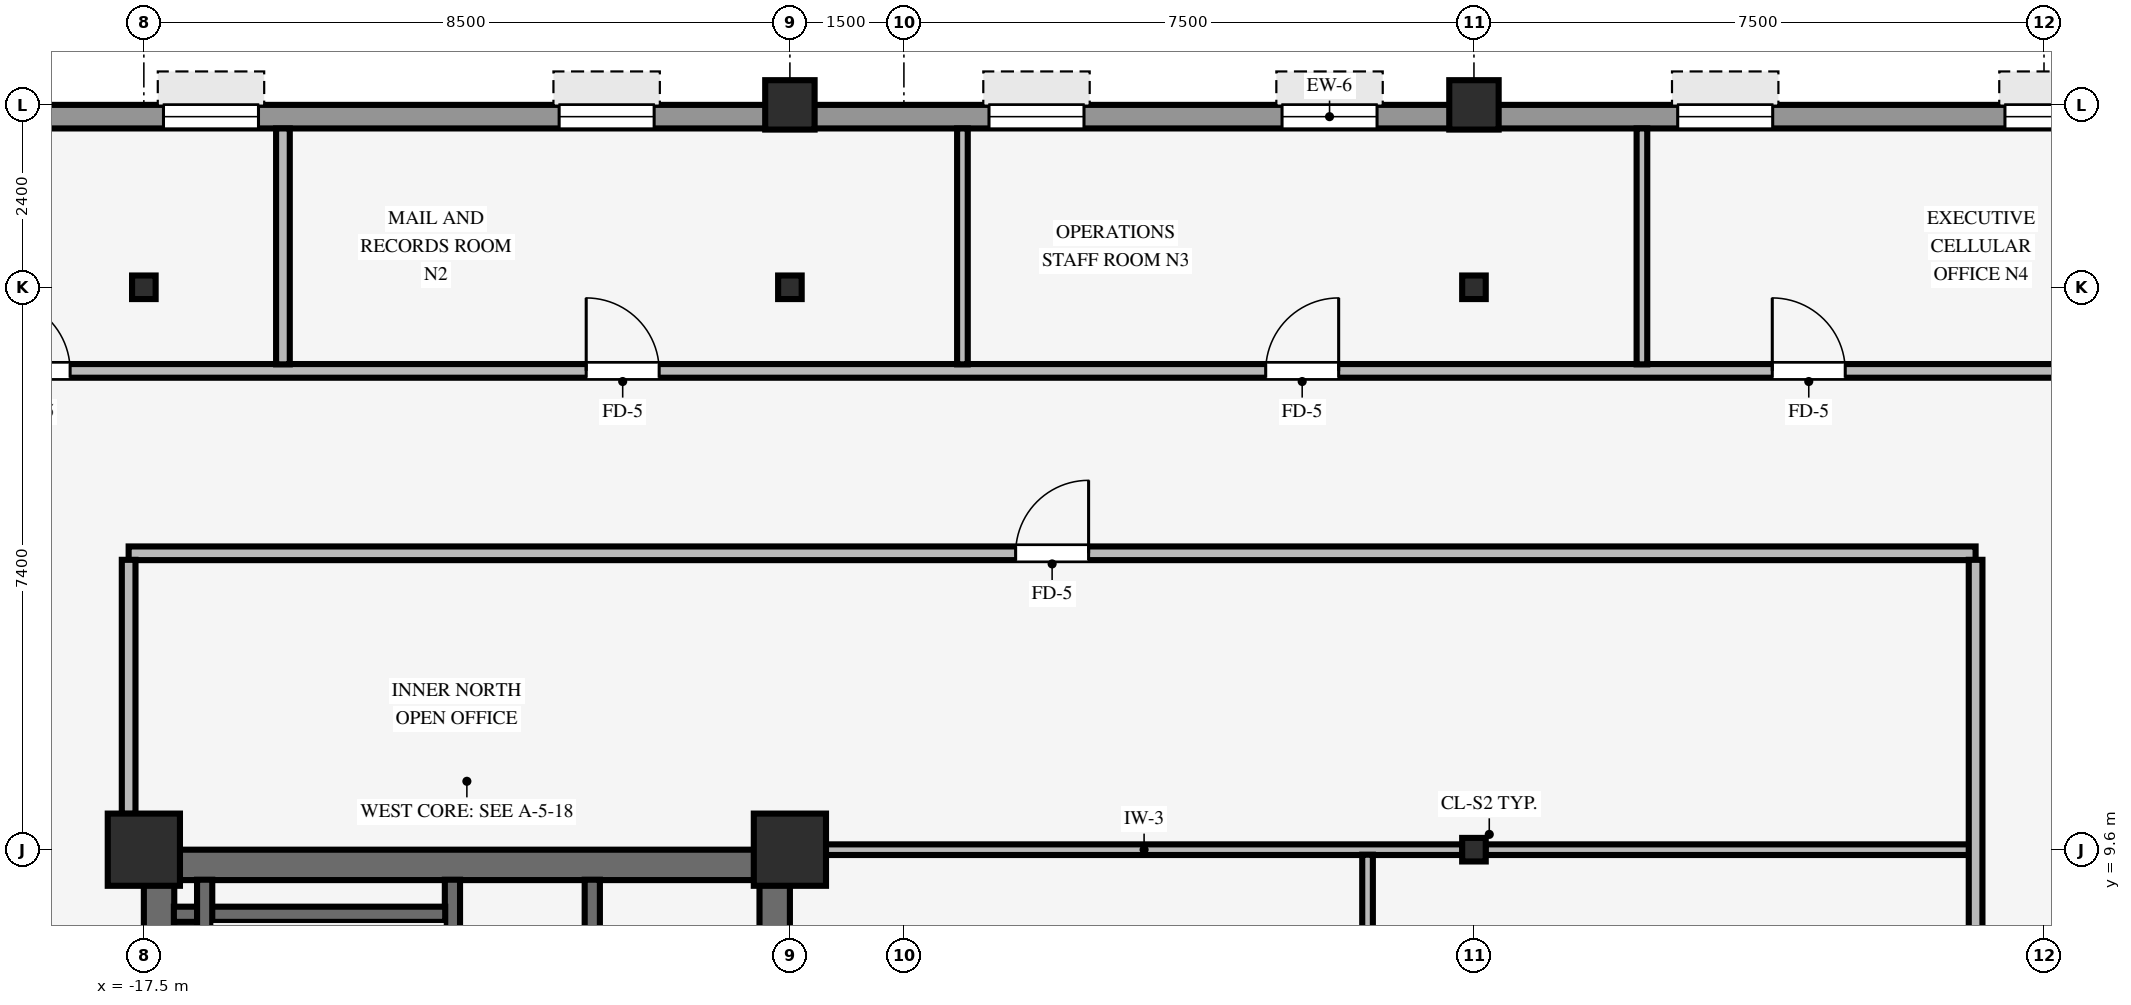
"""IFC4 building model, lengths in metres.
Left out: names, types, materials, properties, quantities, classifications, styles, units other than length and angle.
Written with IfcOpenShell. Run it as: python <this file> out.ifc"""

import sys

from ifc_helpers import new_model, si_unit, direction, frame, frame_2d, origin, origin_2d, place, context, subcontext, project, spatial, rectangle, hollow_rectangle, i_section, extrude, source, transform, mapped, element, fill, save


model = new_model("IFC4")
c1 = context("Model", 3, precision=1e-05, world=origin(), true_north=direction((0.0, 1.0)))
c2 = subcontext(c1, "Body", "Model", "MODEL_VIEW")
j1 = project(units=[si_unit("LENGTHUNIT", "METRE"), si_unit("PLANEANGLEUNIT", "RADIAN")], contexts=[c1])
p1 = place(None, origin())
s1 = spatial("IfcSite", under=j1, at=p1, CompositionType="ELEMENT")
p2 = place(p1, origin())
s2 = spatial("IfcBuilding", under=s1, at=p2, CompositionType="ELEMENT")
p3 = place(p2, frame((0.0, 0.0, 182.25)))
s3 = spatial("IfcBuildingStorey", under=s2, at=p3, CompositionType="ELEMENT", Elevation=182.25)
p4 = place(p3, frame((-17.5, 9.4, 0.0), z_axis=(0.0, 0.0, 1.0), x_axis=(1.0, 0.0, 0.0)))
e1 = element("IfcWall", 1, at=p4, inside=s3, PredefinedType="SHEAR", context=c2, shape_type="SweptSolid", body=[
    extrude(rectangle(XDim=8.5, YDim=0.4, at=frame_2d((4.25, 0.0))), origin(), (0.0, 0.0, 1.0), 3.25),
])
p5 = place(p3, frame((-17.3, -9.205, 0.0), z_axis=(0.0, 0.0, 1.0), x_axis=(0.0, 1.0, 0.0)))
e2 = element("IfcWall", 2, at=p5, inside=s3, PredefinedType="SHEAR", context=c2, shape_type="SweptSolid", body=[
    extrude(rectangle(XDim=18.41, YDim=0.4, at=frame_2d((9.205, 0.0))), origin(), (0.0, 0.0, 1.0), 3.25),
])
p6 = place(p3, frame((-9.2, -9.205, 0.0), z_axis=(0.0, 0.0, 1.0), x_axis=(0.0, 1.0, 0.0)))
e3 = element("IfcWall", 3, at=p6, inside=s3, PredefinedType="SHEAR", context=c2, shape_type="SweptSolid", body=[
    extrude(rectangle(XDim=18.41, YDim=0.4, at=frame_2d((9.205, 0.0))), origin(), (0.0, 0.0, 1.0), 3.25),
])
p7 = place(p6, frame((8.605, 0.0, 0.0)))
e4 = element("IfcOpeningElement", 4, at=p7, cuts=e3, PredefinedType="OPENING", context=c2, shape_type="SweptSolid", body=[
    extrude(rectangle(XDim=1.2, YDim=2.15, at=frame_2d((0.6, 1.075))), frame((0.0, 0.21, 0.0), z_axis=(0.0, -1.0, 0.0), x_axis=(1.0, 0.0, 0.0)), (0.0, 0.0, 1.0), 0.42),
])
for number, where, z_axis, x_axis in (
    (5, (-17.5, 9.6, 0.0), (0.0, 0.0, 1.0), (1.0, 0.0, 0.0)),
    (6, (-9.0, 9.6, 0.0), (0.0, 0.0, 1.0), (1.0, 0.0, 0.0)),
):
    element("IfcColumn", number, at=place(p3, frame(where, z_axis=z_axis, x_axis=x_axis)), inside=s3, PredefinedType="COLUMN", context=c2, shape_type="SweptSolid", body=[
        extrude(rectangle(XDim=0.95, YDim=0.95, at=origin_2d()), origin(), (0.0, 0.0, 1.0), 3.25),
    ])
for number, where, z_axis, x_axis in (
    (7, (-9.0, 19.4, 0.0), (0.0, 0.0, 1.0), (1.0, 0.0, 0.0)),
    (8, (0.0, 19.4, 0.0), (0.0, 0.0, 1.0), (1.0, 0.0, 0.0)),
):
    element("IfcColumn", number, at=place(p3, frame(where, z_axis=z_axis, x_axis=x_axis)), inside=s3, PredefinedType="COLUMN", context=c2, shape_type="SweptSolid", body=[
        extrude(hollow_rectangle(XDim=0.65, YDim=0.65, WallThickness=0.04, InnerFilletRadius=0.04, OuterFilletRadius=0.08, at=origin_2d()), origin(), (0.0, 0.0, 1.0), 3.25),
    ])
for number, where, z_axis, x_axis in (
    (9, (0.0, 9.6, 0.0), (0.0, 0.0, 1.0), (1.0, 0.0, 0.0)),
    (10, (0.0, 17.0, 0.0), (0.0, 0.0, 1.0), (1.0, 0.0, 0.0)),
    (11, (-17.5, 17.0, 0.0), (0.0, 0.0, 1.0), (1.0, 0.0, 0.0)),
    (12, (-9.0, 17.0, 0.0), (0.0, 0.0, 1.0), (1.0, 0.0, 0.0)),
):
    element("IfcColumn", number, at=place(p3, frame(where, z_axis=z_axis, x_axis=x_axis)), inside=s3, PredefinedType="COLUMN", context=c2, shape_type="SweptSolid", body=[
        extrude(i_section(OverallWidth=0.31, OverallDepth=0.31, WebThickness=0.015, FlangeThickness=0.015, FilletRadius=0.015, at=origin_2d()), origin(), (0.0, 0.0, 1.0), 3.25),
    ])
p8 = place(p3, frame((-24.3, 19.245, 0.0), z_axis=(0.0, 0.0, 1.0), x_axis=(1.0, 0.0, 0.0)))
e13 = element("IfcWall", 13, at=p8, inside=s3, PredefinedType="STANDARD", context=c2, shape_type="SweptSolid", body=[
    extrude(rectangle(XDim=44.8, YDim=0.31, at=frame_2d((22.4, 0.0))), origin(), (0.0, 0.0, 1.0), 2.585),
])
p9 = place(p8, frame((2.753, 0.0, 0.8)))
e14 = element("IfcOpeningElement", 14, at=p9, cuts=e13, PredefinedType="OPENING", context=c2, shape_type="SweptSolid", body=[
    extrude(rectangle(XDim=1.25, YDim=1.52, at=frame_2d((0.625, 0.76))), frame((0.0, 0.165, 0.0), z_axis=(0.0, -1.0, 0.0), x_axis=(1.0, 0.0, 0.0)), (0.0, 0.0, 1.0), 0.33),
])
p10 = place(p8, frame((7.058, 0.0, 0.8)))
e15 = element("IfcOpeningElement", 15, at=p10, cuts=e13, PredefinedType="OPENING", context=c2, shape_type="SweptSolid", body=[
    extrude(rectangle(XDim=1.25, YDim=1.52, at=frame_2d((0.625, 0.76))), frame((0.0, 0.165, 0.0), z_axis=(0.0, -1.0, 0.0), x_axis=(1.0, 0.0, 0.0)), (0.0, 0.0, 1.0), 0.33),
])
p11 = place(p8, frame((12.264, 0.0, 0.8)))
e16 = element("IfcOpeningElement", 16, at=p11, cuts=e13, PredefinedType="OPENING", context=c2, shape_type="SweptSolid", body=[
    extrude(rectangle(XDim=1.25, YDim=1.52, at=frame_2d((0.625, 0.76))), frame((0.0, 0.165, 0.0), z_axis=(0.0, -1.0, 0.0), x_axis=(1.0, 0.0, 0.0)), (0.0, 0.0, 1.0), 0.33),
])
p12 = place(p8, frame((17.919, 0.0, 0.8)))
e17 = element("IfcOpeningElement", 17, at=p12, cuts=e13, PredefinedType="OPENING", context=c2, shape_type="SweptSolid", body=[
    extrude(rectangle(XDim=1.25, YDim=1.52, at=frame_2d((0.625, 0.76))), frame((0.0, 0.165, 0.0), z_axis=(0.0, -1.0, 0.0), x_axis=(1.0, 0.0, 0.0)), (0.0, 0.0, 1.0), 0.33),
])
p13 = place(p8, frame((21.775, 0.0, 0.8)))
e18 = element("IfcOpeningElement", 18, at=p13, cuts=e13, PredefinedType="OPENING", context=c2, shape_type="SweptSolid", body=[
    extrude(rectangle(XDim=1.25, YDim=1.52, at=frame_2d((0.625, 0.76))), frame((0.0, 0.165, 0.0), z_axis=(0.0, -1.0, 0.0), x_axis=(1.0, 0.0, 0.0)), (0.0, 0.0, 1.0), 0.33),
])
p14 = place(p8, frame((26.981, 0.0, 0.8)))
e19 = element("IfcOpeningElement", 19, at=p14, cuts=e13, PredefinedType="OPENING", context=c2, shape_type="SweptSolid", body=[
    extrude(rectangle(XDim=1.25, YDim=1.52, at=frame_2d((0.625, 0.76))), frame((0.0, 0.165, 0.0), z_axis=(0.0, -1.0, 0.0), x_axis=(1.0, 0.0, 0.0)), (0.0, 0.0, 1.0), 0.33),
])
p15 = place(p8, frame((31.286, 0.0, 0.8)))
e20 = element("IfcOpeningElement", 20, at=p15, cuts=e13, PredefinedType="OPENING", context=c2, shape_type="SweptSolid", body=[
    extrude(rectangle(XDim=1.25, YDim=1.52, at=frame_2d((0.625, 0.76))), frame((0.0, 0.165, 0.0), z_axis=(0.0, -1.0, 0.0), x_axis=(1.0, 0.0, 0.0)), (0.0, 0.0, 1.0), 0.33),
])
p16 = place(p8, frame((36.042, 0.0, 0.8)))
e21 = element("IfcOpeningElement", 21, at=p16, cuts=e13, PredefinedType="OPENING", context=c2, shape_type="SweptSolid", body=[
    extrude(rectangle(XDim=1.25, YDim=1.52, at=frame_2d((0.625, 0.76))), frame((0.0, 0.165, 0.0), z_axis=(0.0, -1.0, 0.0), x_axis=(1.0, 0.0, 0.0)), (0.0, 0.0, 1.0), 0.33),
])
p17 = place(p8, frame((40.797, 0.0, 0.8)))
e22 = element("IfcOpeningElement", 22, at=p17, cuts=e13, PredefinedType="OPENING", context=c2, shape_type="SweptSolid", body=[
    extrude(rectangle(XDim=1.25, YDim=1.52, at=frame_2d((0.625, 0.76))), frame((0.0, 0.165, 0.0), z_axis=(0.0, -1.0, 0.0), x_axis=(1.0, 0.0, 0.0)), (0.0, 0.0, 1.0), 0.33),
])
p18 = place(p3, frame((-13.44, 0.9, 0.0), z_axis=(0.0, 0.0, 1.0), x_axis=(0.0, 1.0, 0.0)))
e23 = element("IfcWall", 23, at=p18, inside=s3, PredefinedType="SHEAR", context=c2, shape_type="SweptSolid", body=[
    extrude(rectangle(XDim=8.305, YDim=0.2, at=frame_2d((4.153, 0.0))), origin(), (0.0, 0.0, 1.0), 3.25),
])
p19 = place(p18, frame((1.53, 0.0, 0.0), z_axis=(0.0, 0.0, 1.0), x_axis=(-1.0, 0.0, 0.0)))
e24 = element("IfcOpeningElement", 24, at=p19, cuts=e23, PredefinedType="OPENING", context=c2, shape_type="SweptSolid", body=[
    extrude(rectangle(XDim=1.1, YDim=2.15, at=frame_2d((0.55, 1.075))), frame((0.0, 0.11, 0.0), z_axis=(0.0, -1.0, 0.0), x_axis=(1.0, 0.0, 0.0)), (0.0, 0.0, 1.0), 0.22),
])
p20 = place(p3, frame((-17.105, 8.75, 0.0), z_axis=(0.0, 0.0, 1.0), x_axis=(1.0, 0.0, 0.0)))
e25 = element("IfcWall", 25, at=p20, inside=s3, PredefinedType="SHEAR", context=c2, shape_type="SweptSolid", body=[
    extrude(rectangle(XDim=3.57, YDim=0.2, at=frame_2d((1.785, 0.0))), origin(), (0.0, 0.0, 1.0), 3.25),
])
p21 = place(p3, frame((-16.7, 1.095, 0.0), z_axis=(0.0, 0.0, 1.0), x_axis=(0.0, 1.0, 0.0)))
e26 = element("IfcWall", 26, at=p21, inside=s3, PredefinedType="SHEAR", context=c2, shape_type="SweptSolid", body=[
    extrude(rectangle(XDim=8.11, YDim=0.2, at=frame_2d((4.055, 0.0))), origin(), (0.0, 0.0, 1.0), 3.25),
])
p22 = place(p3, frame((-11.6, 1.3, 0.0), z_axis=(0.0, 0.0, 1.0), x_axis=(0.0, 1.0, 0.0)))
e27 = element("IfcWall", 27, at=p22, inside=s3, PredefinedType="SHEAR", context=c2, shape_type="SweptSolid", body=[
    extrude(rectangle(XDim=7.905, YDim=0.2, at=frame_2d((3.953, 0.0))), origin(), (0.0, 0.0, 1.0), 3.25),
])
p23 = place(p3, frame((-8.529, 9.6, 0.0), z_axis=(0.0, 0.0, 1.0), x_axis=(1.0, 0.0, 0.0)))
e28 = element("IfcWall", 28, at=p23, inside=s3, PredefinedType="PARTITIONING", context=c2, shape_type="SweptSolid", body=[
    extrude(rectangle(XDim=8.378, YDim=0.14, at=frame_2d((4.189, 0.0))), origin(), (0.0, 0.0, 1.0), 2.285),
])
p24 = place(p3, frame((0.151, 9.6, 0.0), z_axis=(0.0, 0.0, 1.0), x_axis=(1.0, 0.0, 0.0)))
e29 = element("IfcWall", 29, at=p24, inside=s3, PredefinedType="PARTITIONING", context=c2, shape_type="SweptSolid", body=[
    extrude(rectangle(XDim=6.363, YDim=0.14, at=frame_2d((3.182, 0.0))), origin(), (0.0, 0.0, 1.0), 2.285),
])
p25 = place(p3, frame((-17.7, 13.5, 0.0), z_axis=(0.0, 0.0, 1.0), x_axis=(1.0, 0.0, 0.0)))
e30 = element("IfcWall", 30, at=p25, inside=s3, PredefinedType="PARTITIONING", context=c2, shape_type="SweptSolid", body=[
    extrude(rectangle(XDim=24.3, YDim=0.18, at=frame_2d((12.15, 0.0))), origin(), (0.0, 0.0, 1.0), 2.888),
])
p26 = place(p25, frame((11.67, 0.0, 0.0)))
e31 = element("IfcOpeningElement", 31, at=p26, cuts=e30, PredefinedType="OPENING", context=c2, shape_type="SweptSolid", body=[
    extrude(rectangle(XDim=0.96, YDim=2.1, at=frame_2d((0.48, 1.05))), frame((0.0, 0.1, 0.0), z_axis=(0.0, -1.0, 0.0), x_axis=(1.0, 0.0, 0.0)), (0.0, 0.0, 1.0), 0.2),
])
p27 = place(p3, frame((-26.09, 15.9, 0.0), z_axis=(0.0, 0.0, 1.0), x_axis=(1.0, 0.0, 0.0)))
e32 = element("IfcWall", 32, at=p27, inside=s3, PredefinedType="PARTITIONING", context=c2, shape_type="SweptSolid", body=[
    extrude(rectangle(XDim=48.38, YDim=0.18, at=frame_2d((24.19, 0.0))), origin(), (0.0, 0.0, 1.0), 3.24),
])
p28 = place(p27, frame((41.36, 0.0, 0.0)))
e33 = element("IfcOpeningElement", 33, at=p28, cuts=e32, PredefinedType="OPENING", context=c2, shape_type="SweptSolid", body=[
    extrude(rectangle(XDim=0.96, YDim=2.1, at=frame_2d((0.48, 1.05))), frame((0.0, 0.1, 0.0), z_axis=(0.0, -1.0, 0.0), x_axis=(1.0, 0.0, 0.0)), (0.0, 0.0, 1.0), 0.2),
])
p29 = place(p27, frame((23.35, 0.0, 0.0)))
e34 = element("IfcOpeningElement", 34, at=p29, cuts=e32, PredefinedType="OPENING", context=c2, shape_type="SweptSolid", body=[
    extrude(rectangle(XDim=0.96, YDim=2.1, at=frame_2d((0.48, 1.05))), frame((0.0, 0.1, 0.0), z_axis=(0.0, -1.0, 0.0), x_axis=(1.0, 0.0, 0.0)), (0.0, 0.0, 1.0), 0.2),
])
p30 = place(p27, frame((14.41, 0.0, 0.0)))
e35 = element("IfcOpeningElement", 35, at=p30, cuts=e32, PredefinedType="OPENING", context=c2, shape_type="SweptSolid", body=[
    extrude(rectangle(XDim=0.96, YDim=2.1, at=frame_2d((0.48, 1.05))), frame((0.0, 0.1, 0.0), z_axis=(0.0, -1.0, 0.0), x_axis=(1.0, 0.0, 0.0)), (0.0, 0.0, 1.0), 0.2),
])
p31 = place(p27, frame((30.015, 0.0, 0.0)))
e36 = element("IfcOpeningElement", 36, at=p31, cuts=e32, PredefinedType="OPENING", context=c2, shape_type="SweptSolid", body=[
    extrude(rectangle(XDim=0.96, YDim=2.1, at=frame_2d((0.48, 1.05))), frame((0.0, 0.1, 0.0), z_axis=(0.0, -1.0, 0.0), x_axis=(1.0, 0.0, 0.0)), (0.0, 0.0, 1.0), 0.2),
])
p32 = place(p27, frame((6.66, 0.0, 0.0)))
e37 = element("IfcOpeningElement", 37, at=p32, cuts=e32, PredefinedType="OPENING", context=c2, shape_type="SweptSolid", body=[
    extrude(rectangle(XDim=0.96, YDim=2.1, at=frame_2d((0.48, 1.05))), frame((0.0, 0.1, 0.0), z_axis=(0.0, -1.0, 0.0), x_axis=(1.0, 0.0, 0.0)), (0.0, 0.0, 1.0), 0.2),
])
p33 = place(p3, frame((-17.7, 10.071, 0.0), z_axis=(0.0, 0.0, 1.0), x_axis=(0.0, 1.0, 0.0)))
e38 = element("IfcWall", 38, at=p33, inside=s3, PredefinedType="PARTITIONING", context=c2, shape_type="SweptSolid", body=[
    extrude(rectangle(XDim=3.343, YDim=0.18, at=frame_2d((1.671, 0.0))), origin(), (0.0, 0.0, 1.0), 2.335),
])
p34 = place(p3, frame((-15.67, 15.986, 0.0), z_axis=(0.0, 0.0, 1.0), x_axis=(0.0, 1.0, 0.0)))
e39 = element("IfcWall", 39, at=p34, inside=s3, PredefinedType="PARTITIONING", context=c2, shape_type="SweptSolid", body=[
    extrude(rectangle(XDim=3.104, YDim=0.18, at=frame_2d((1.552, 0.0))), origin(), (0.0, 0.0, 1.0), 3.24),
])
p35 = place(p3, frame((-6.73, 15.986, 0.0), z_axis=(0.0, 0.0, 1.0), x_axis=(0.0, 1.0, 0.0)))
e40 = element("IfcWall", 40, at=p35, inside=s3, PredefinedType="PARTITIONING", context=c2, shape_type="SweptSolid", body=[
    extrude(rectangle(XDim=3.104, YDim=0.14, at=frame_2d((1.552, 0.0))), origin(), (0.0, 0.0, 1.0), 3.24),
])
p36 = place(p3, frame((-1.4, 1.336, 0.0), z_axis=(0.0, 0.0, 1.0), x_axis=(0.0, 1.0, 0.0)))
e41 = element("IfcWall", 41, at=p36, inside=s3, PredefinedType="PARTITIONING", context=c2, shape_type="SweptSolid", body=[
    extrude(rectangle(XDim=8.198, YDim=0.14, at=frame_2d((4.099, 0.0))), origin(), (0.0, 0.0, 1.0), 3.24),
])
p37 = place(p3, frame((2.21, 15.986, 0.0), z_axis=(0.0, 0.0, 1.0), x_axis=(0.0, 1.0, 0.0)))
e42 = element("IfcWall", 42, at=p37, inside=s3, PredefinedType="PARTITIONING", context=c2, shape_type="SweptSolid", body=[
    extrude(rectangle(XDim=3.104, YDim=0.14, at=frame_2d((1.552, 0.0))), origin(), (0.0, 0.0, 1.0), 3.24),
])
p38 = place(p3, frame((6.6, 1.336, 0.0), z_axis=(0.0, 0.0, 1.0), x_axis=(0.0, 1.0, 0.0)))
e43 = element("IfcWall", 43, at=p38, inside=s3, PredefinedType="PARTITIONING", context=c2, shape_type="SweptSolid", body=[
    extrude(rectangle(XDim=12.078, YDim=0.18, at=frame_2d((6.039, 0.0))), origin(), (0.0, 0.0, 1.0), 3.24),
])
p39 = place(p38, frame((3.652, 0.0, 0.0)))
e44 = element("IfcOpeningElement", 44, at=p39, cuts=e43, PredefinedType="OPENING", context=c2, shape_type="SweptSolid", body=[
    extrude(rectangle(XDim=0.96, YDim=2.1, at=frame_2d((0.48, 1.05))), frame((0.0, 0.1, 0.0), z_axis=(0.0, -1.0, 0.0), x_axis=(1.0, 0.0, 0.0)), (0.0, 0.0, 1.0), 0.2),
])
m1 = source(origin(), c2, "Body", "SweptSolid", [
    extrude(rectangle(XDim=1.25, YDim=1.52, at=frame_2d((0.625, 0.76))), frame((0.0, 0.03, 0.0), z_axis=(0.0, -1.0, 0.0), x_axis=(1.0, 0.0, 0.0)), (0.0, 0.0, 1.0), 0.06),
])
p40 = place(p10, origin())
e45 = element("IfcWindow", 45, at=p40, inside=s3, PartitioningType="SINGLE_PANEL", PredefinedType="WINDOW", context=c2, shape_type="MappedRepresentation", body=[
    mapped(m1, transform((0.0, 0.0, 0.0), scale=1.0)),
])
fill(e15, e45)
p41 = place(p11, origin())
e46 = element("IfcWindow", 46, at=p41, inside=s3, PartitioningType="SINGLE_PANEL", PredefinedType="WINDOW", context=c2, shape_type="MappedRepresentation", body=[
    mapped(m1, transform((0.0, 0.0, 0.0), scale=1.0)),
])
fill(e16, e46)
p42 = place(p12, origin())
e47 = element("IfcWindow", 47, at=p42, inside=s3, PartitioningType="SINGLE_PANEL", PredefinedType="WINDOW", context=c2, shape_type="MappedRepresentation", body=[
    mapped(m1, transform((0.0, 0.0, 0.0), scale=1.0)),
])
fill(e17, e47)
p43 = place(p13, origin())
e48 = element("IfcWindow", 48, at=p43, inside=s3, PartitioningType="SINGLE_PANEL", PredefinedType="WINDOW", context=c2, shape_type="MappedRepresentation", body=[
    mapped(m1, transform((0.0, 0.0, 0.0), scale=1.0)),
])
fill(e18, e48)
p44 = place(p14, origin())
e49 = element("IfcWindow", 49, at=p44, inside=s3, PartitioningType="SINGLE_PANEL", PredefinedType="WINDOW", context=c2, shape_type="MappedRepresentation", body=[
    mapped(m1, transform((0.0, 0.0, 0.0), scale=1.0)),
])
fill(e19, e49)
p45 = place(p15, origin())
e50 = element("IfcWindow", 50, at=p45, inside=s3, PartitioningType="SINGLE_PANEL", PredefinedType="WINDOW", context=c2, shape_type="MappedRepresentation", body=[
    mapped(m1, transform((0.0, 0.0, 0.0), scale=1.0)),
])
fill(e20, e50)
m2 = source(origin(), c2, "Body", "SweptSolid", [
    extrude(rectangle(XDim=0.96, YDim=2.1, at=frame_2d((0.48, 1.05))), frame((0.0, 0.025, 0.0), z_axis=(0.0, -1.0, 0.0), x_axis=(1.0, 0.0, 0.0)), (0.0, 0.0, 1.0), 0.05),
])
p46 = place(p26, origin())
e51 = element("IfcDoor", 51, at=p46, inside=s3, OperationType="SINGLE_SWING_RIGHT", PredefinedType="DOOR", context=c2, shape_type="MappedRepresentation", body=[
    mapped(m2, transform((0.0, 0.0, 0.0), scale=1.0)),
])
fill(e31, e51)
p47 = place(p29, origin())
e52 = element("IfcDoor", 52, at=p47, inside=s3, OperationType="SINGLE_SWING_RIGHT", PredefinedType="DOOR", context=c2, shape_type="MappedRepresentation", body=[
    mapped(m2, transform((0.0, 0.0, 0.0), scale=1.0)),
])
fill(e34, e52)
p48 = place(p30, origin())
e53 = element("IfcDoor", 53, at=p48, inside=s3, OperationType="SINGLE_SWING_LEFT", PredefinedType="DOOR", context=c2, shape_type="MappedRepresentation", body=[
    mapped(m2, transform((0.0, 0.0, 0.0), scale=1.0)),
])
fill(e35, e53)
p49 = place(p31, origin())
e54 = element("IfcDoor", 54, at=p49, inside=s3, OperationType="SINGLE_SWING_LEFT", PredefinedType="DOOR", context=c2, shape_type="MappedRepresentation", body=[
    mapped(m2, transform((0.0, 0.0, 0.0), scale=1.0)),
])
fill(e36, e54)
p50 = place(p32, origin())
e55 = element("IfcDoor", 55, at=p50, inside=s3, OperationType="SINGLE_SWING_LEFT", PredefinedType="DOOR", context=c2, shape_type="MappedRepresentation", body=[
    mapped(m2, transform((0.0, 0.0, 0.0), scale=1.0)),
])
fill(e37, e55)
save(model, sys.argv[1])
